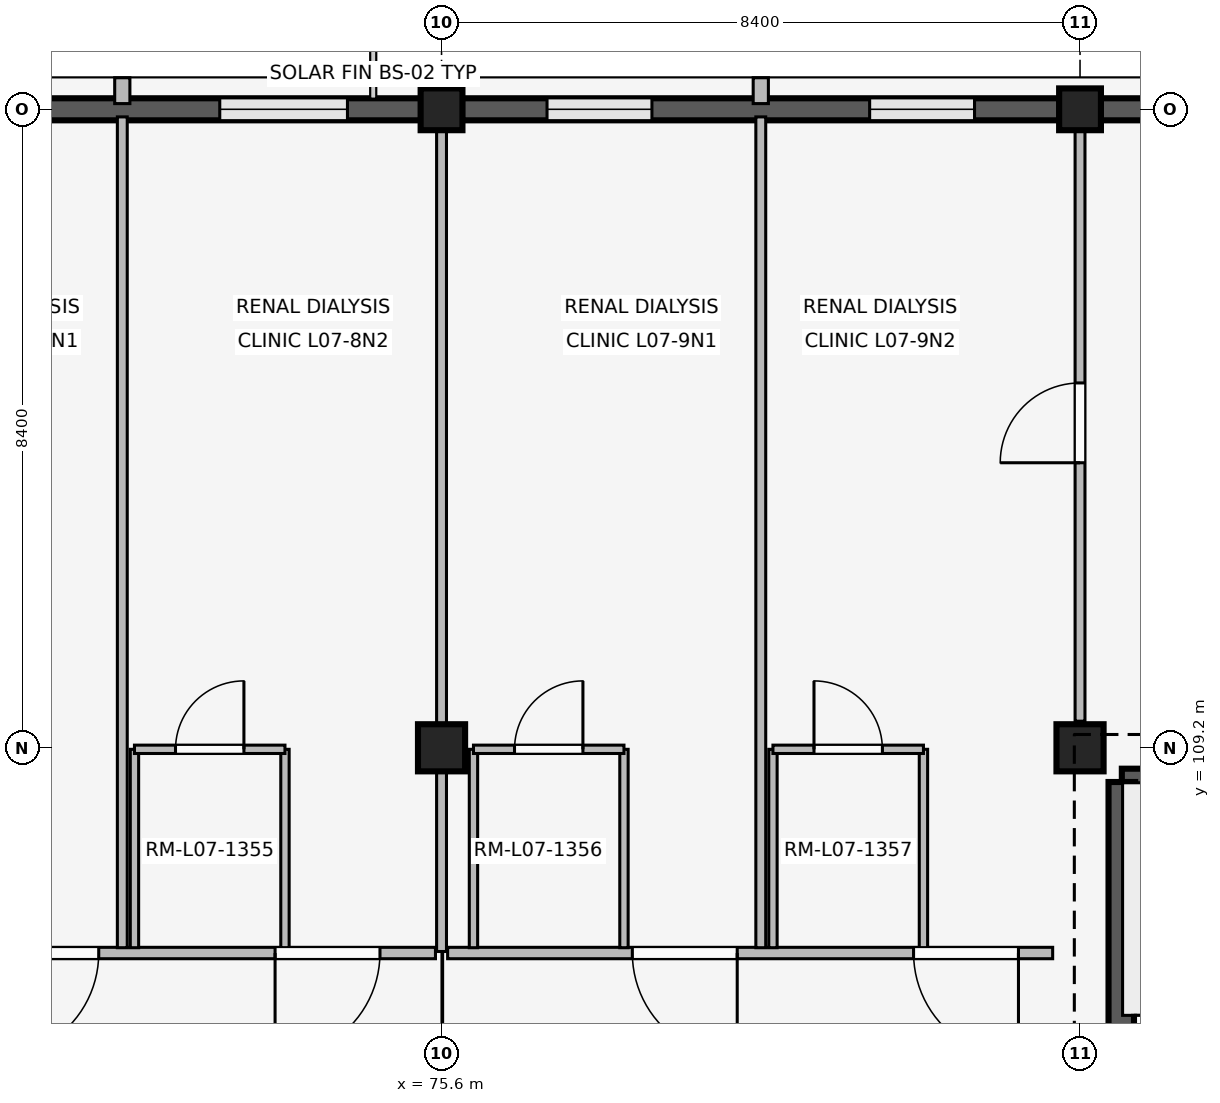
"""IFC4 building model, lengths in metres.
Left out: names, types, materials, properties, quantities, classifications, styles, units other than length and angle.
Written with IfcOpenShell. Run it as: python <this file> out.ifc"""

import sys

from ifc_helpers import new_model, si_unit, direction, frame, frame_2d, origin, origin_2d, place, context, subcontext, project, spatial, rectangle, extrude, element, fill, save


model = new_model("IFC4")
c1 = context("Model", 3, precision=1e-05, world=origin(), true_north=direction((0.0, 1.0)))
c2 = subcontext(c1, "Body", "Model", "MODEL_VIEW")
j1 = project(units=[si_unit("LENGTHUNIT", "METRE"), si_unit("PLANEANGLEUNIT", "RADIAN")], contexts=[c1])
p1 = place(None, origin())
s1 = spatial("IfcSite", under=j1, at=p1, CompositionType="ELEMENT")
p2 = place(p1, origin())
s2 = spatial("IfcBuilding", under=s1, at=p2, CompositionType="ELEMENT")
p3 = place(p2, frame((0.0, 0.0, 28.8)))
s3 = spatial("IfcBuildingStorey", under=s2, at=p3, CompositionType="ELEMENT", Elevation=28.8)
p4 = place(p3, frame((75.6, 109.2, 0.0), z_axis=(0.0, 0.0, 1.0), x_axis=(1.0, 0.0, 0.0)))
e1 = element("IfcColumn", 1, at=p4, inside=s3, PredefinedType="COLUMN", context=c2, shape_type="SweptSolid", body=[
    extrude(rectangle(XDim=0.62, YDim=0.62, at=origin_2d()), origin(), (0.0, 0.0, 1.0), 4.2),
])
p5 = place(p3, frame((75.6, 117.6, 0.0), z_axis=(0.0, 0.0, 1.0), x_axis=(1.0, 0.0, 0.0)))
e2 = element("IfcColumn", 2, at=p5, inside=s3, PredefinedType="COLUMN", context=c2, shape_type="SweptSolid", body=[
    extrude(rectangle(XDim=0.55, YDim=0.55, at=origin_2d()), origin(), (0.0, 0.0, 1.0), 4.2),
])
p6 = place(p3, frame((84.0, 109.2, 0.0), z_axis=(0.0, 0.0, 1.0), x_axis=(1.0, 0.0, 0.0)))
e3 = element("IfcColumn", 3, at=p6, inside=s3, PredefinedType="COLUMN", context=c2, shape_type="SweptSolid", body=[
    extrude(rectangle(XDim=0.62, YDim=0.62, at=origin_2d()), origin(), (0.0, 0.0, 1.0), 4.2),
])
p7 = place(p3, frame((84.0, 117.6, 0.0), z_axis=(0.0, 0.0, 1.0), x_axis=(1.0, 0.0, 0.0)))
e4 = element("IfcColumn", 4, at=p7, inside=s3, PredefinedType="COLUMN", context=c2, shape_type="SweptSolid", body=[
    extrude(rectangle(XDim=0.55, YDim=0.55, at=origin_2d()), origin(), (0.0, 0.0, 1.0), 4.2),
])
p8 = place(p3, frame((67.47, 117.6, 0.0), z_axis=(0.0, 0.0, 1.0), x_axis=(1.0, 0.0, 0.0)))
e5 = element("IfcWall", 5, at=p8, inside=s3, PredefinedType="SOLIDWALL", context=c2, shape_type="SweptSolid", body=[
    extrude(rectangle(XDim=7.86, YDim=0.29, at=frame_2d((3.93, 0.0))), origin(), (0.0, 0.0, 1.0), 3.34),
])
p9 = place(p8, frame((0.968, 0.0, 0.85)))
e6 = element("IfcOpeningElement", 6, at=p9, cuts=e5, PredefinedType="OPENING", context=c2, shape_type="SweptSolid", body=[
    extrude(rectangle(XDim=1.68, YDim=2.05, at=frame_2d((0.84, 1.025))), frame((0.0, 0.155, 0.0), z_axis=(0.0, -1.0, 0.0), x_axis=(1.0, 0.0, 0.0)), (0.0, 0.0, 1.0), 0.31),
])
p10 = place(p8, frame((5.212, 0.0, 0.85)))
e7 = element("IfcOpeningElement", 7, at=p10, cuts=e5, PredefinedType="OPENING", context=c2, shape_type="SweptSolid", body=[
    extrude(rectangle(XDim=1.68, YDim=2.05, at=frame_2d((0.84, 1.025))), frame((0.0, 0.155, 0.0), z_axis=(0.0, -1.0, 0.0), x_axis=(1.0, 0.0, 0.0)), (0.0, 0.0, 1.0), 0.31),
])
p11 = place(p3, frame((71.4, 117.675, 0.0), z_axis=(0.0, 0.0, 1.0), x_axis=(0.0, 1.0, 0.0)))
e8 = element("IfcWall", 8, at=p11, inside=s3, PredefinedType="ELEMENTEDWALL", context=c2, shape_type="SweptSolid", body=[
    extrude(rectangle(XDim=0.34, YDim=0.2, at=frame_2d((0.17, 0.0))), origin(), (0.0, 0.0, 1.0), 3.32),
])
p12 = place(p3, frame((75.87, 117.6, 0.0), z_axis=(0.0, 0.0, 1.0), x_axis=(1.0, 0.0, 0.0)))
e9 = element("IfcWall", 9, at=p12, inside=s3, PredefinedType="SOLIDWALL", context=c2, shape_type="SweptSolid", body=[
    extrude(rectangle(XDim=7.86, YDim=0.29, at=frame_2d((3.93, 0.0))), origin(), (0.0, 0.0, 1.0), 3.34),
])
p13 = place(p12, frame((1.118, 0.0, 0.85)))
e10 = element("IfcOpeningElement", 10, at=p13, cuts=e9, PredefinedType="OPENING", context=c2, shape_type="SweptSolid", body=[
    extrude(rectangle(XDim=1.38, YDim=1.5, at=frame_2d((0.69, 0.75))), frame((0.0, 0.155, 0.0), z_axis=(0.0, -1.0, 0.0), x_axis=(1.0, 0.0, 0.0)), (0.0, 0.0, 1.0), 0.31),
])
p14 = place(p12, frame((5.362, 0.0, 0.85)))
e11 = element("IfcOpeningElement", 11, at=p14, cuts=e9, PredefinedType="OPENING", context=c2, shape_type="SweptSolid", body=[
    extrude(rectangle(XDim=1.38, YDim=1.5, at=frame_2d((0.69, 0.75))), frame((0.0, 0.155, 0.0), z_axis=(0.0, -1.0, 0.0), x_axis=(1.0, 0.0, 0.0)), (0.0, 0.0, 1.0), 0.31),
])
p15 = place(p3, frame((79.8, 117.675, 0.0), z_axis=(0.0, 0.0, 1.0), x_axis=(0.0, 1.0, 0.0)))
e12 = element("IfcWall", 12, at=p15, inside=s3, PredefinedType="ELEMENTEDWALL", context=c2, shape_type="SweptSolid", body=[
    extrude(rectangle(XDim=0.34, YDim=0.2, at=frame_2d((0.17, 0.0))), origin(), (0.0, 0.0, 1.0), 3.32),
])
p16 = place(p3, frame((84.27, 117.6, 0.0), z_axis=(0.0, 0.0, 1.0), x_axis=(1.0, 0.0, 0.0)))
e13 = element("IfcWall", 13, at=p16, inside=s3, PredefinedType="SOLIDWALL", context=c2, shape_type="SweptSolid", body=[
    extrude(rectangle(XDim=7.86, YDim=0.29, at=frame_2d((3.93, 0.0))), origin(), (0.0, 0.0, 1.0), 3.34),
])
p17 = place(p16, frame((1.028, 0.0, 0.85)))
e14 = element("IfcOpeningElement", 14, at=p17, cuts=e13, PredefinedType="OPENING", context=c2, shape_type="SweptSolid", body=[
    extrude(rectangle(XDim=1.56, YDim=1.7, at=frame_2d((0.78, 0.85))), frame((0.0, 0.155, 0.0), z_axis=(0.0, -1.0, 0.0), x_axis=(1.0, 0.0, 0.0)), (0.0, 0.0, 1.0), 0.31),
])
p18 = place(p16, frame((5.272, 0.0, 0.85)))
e15 = element("IfcOpeningElement", 15, at=p18, cuts=e13, PredefinedType="OPENING", context=c2, shape_type="SweptSolid", body=[
    extrude(rectangle(XDim=1.56, YDim=1.7, at=frame_2d((0.78, 0.85))), frame((0.0, 0.155, 0.0), z_axis=(0.0, -1.0, 0.0), x_axis=(1.0, 0.0, 0.0)), (0.0, 0.0, 1.0), 0.31),
])
p19 = place(p3, frame((84.55, 108.75, 0.0), z_axis=(0.0, 0.0, 1.0), x_axis=(1.0, 0.0, 0.0)))
e16 = element("IfcWall", 16, at=p19, inside=s3, PredefinedType="SHEAR", context=c2, shape_type="SweptSolid", body=[
    extrude(rectangle(XDim=7.5, YDim=0.35, at=frame_2d((3.75, 0.0))), origin(), (0.0, 0.0, 1.0), 3.94),
])
p20 = place(p3, frame((84.55, 101.2, 0.0), z_axis=(0.0, 0.0, 1.0), x_axis=(0.0, 1.0, 0.0)))
e17 = element("IfcWall", 17, at=p20, inside=s3, PredefinedType="SHEAR", context=c2, shape_type="SweptSolid", body=[
    extrude(rectangle(XDim=7.55, YDim=0.35, at=frame_2d((3.775, 0.0))), origin(), (0.0, 0.0, 1.0), 3.94),
])
p21 = place(p20, frame((0.28, 0.0, 0.0)))
e18 = element("IfcOpeningElement", 18, at=p21, cuts=e17, PredefinedType="OPENING", context=c2, shape_type="SweptSolid", body=[
    extrude(rectangle(XDim=1.0, YDim=2.15, at=frame_2d((0.5, 1.075))), frame((0.0, 0.185, 0.0), z_axis=(0.0, -1.0, 0.0), x_axis=(1.0, 0.0, 0.0)), (0.0, 0.0, 1.0), 0.37),
])
p22 = place(p3, frame((75.52, 106.5, 0.0), z_axis=(0.0, 0.0, 1.0), x_axis=(-1.0, 0.0, 0.0)))
e19 = element("IfcWall", 19, at=p22, inside=s3, PredefinedType="PARTITIONING", context=c2, shape_type="SweptSolid", body=[
    extrude(rectangle(XDim=8.24, YDim=0.15, at=frame_2d((4.12, 0.0))), origin(), (0.0, 0.0, 1.0), 3.32),
])
p23 = place(p22, frame((0.73, 0.0, 0.0)))
e20 = element("IfcOpeningElement", 20, at=p23, cuts=e19, PredefinedType="OPENING", context=c2, shape_type="SweptSolid", body=[
    extrude(rectangle(XDim=1.38, YDim=2.25, at=frame_2d((0.69, 1.125))), frame((0.0, 0.085, 0.0), z_axis=(0.0, -1.0, 0.0), x_axis=(1.0, 0.0, 0.0)), (0.0, 0.0, 1.0), 0.17),
])
p24 = place(p22, frame((4.43, 0.0, 0.0)))
e21 = element("IfcOpeningElement", 21, at=p24, cuts=e19, PredefinedType="OPENING", context=c2, shape_type="SweptSolid", body=[
    extrude(rectangle(XDim=1.38, YDim=2.25, at=frame_2d((0.69, 1.125))), frame((0.0, 0.085, 0.0), z_axis=(0.0, -1.0, 0.0), x_axis=(1.0, 0.0, 0.0)), (0.0, 0.0, 1.0), 0.17),
])
p25 = place(p3, frame((71.4, 106.57, 0.0), z_axis=(0.0, 0.0, 1.0), x_axis=(0.0, 1.0, 0.0)))
e22 = element("IfcWall", 22, at=p25, inside=s3, PredefinedType="PARTITIONING", context=c2, shape_type="SweptSolid", body=[
    extrude(rectangle(XDim=10.93, YDim=0.13, at=frame_2d((5.465, 0.0))), origin(), (0.0, 0.0, 1.0), 3.32),
])
for number, where, z_axis, x_axis in (
    (23, (71.56, 106.57, 0.0), (0.0, 0.0, 1.0), (0.0, 1.0, 0.0)),
    (24, (73.54, 106.57, 0.0), (0.0, 0.0, 1.0), (0.0, 1.0, 0.0)),
):
    element("IfcWall", number, at=place(p3, frame(where, z_axis=z_axis, x_axis=x_axis)), inside=s3, PredefinedType="PARTITIONING", context=c2, shape_type="SweptSolid", body=[
        extrude(rectangle(XDim=2.61, YDim=0.11, at=frame_2d((1.305, 0.0))), origin(), (0.0, 0.0, 1.0), 3.32),
    ])
p26 = place(p3, frame((71.56, 109.18, 0.0), z_axis=(0.0, 0.0, 1.0), x_axis=(1.0, 0.0, 0.0)))
e25 = element("IfcWall", 25, at=p26, inside=s3, PredefinedType="PARTITIONING", context=c2, shape_type="SweptSolid", body=[
    extrude(rectangle(XDim=1.98, YDim=0.11, at=frame_2d((0.99, 0.0))), origin(), (0.0, 0.0, 1.0), 3.32),
])
p27 = place(p26, frame((0.54, 0.0, 0.0)))
e26 = element("IfcOpeningElement", 26, at=p27, cuts=e25, PredefinedType="OPENING", context=c2, shape_type="SweptSolid", body=[
    extrude(rectangle(XDim=0.9, YDim=2.1, at=frame_2d((0.45, 1.05))), frame((0.0, 0.065, 0.0), z_axis=(0.0, -1.0, 0.0), x_axis=(1.0, 0.0, 0.0)), (0.0, 0.0, 1.0), 0.13),
])
p28 = place(p3, frame((75.6, 106.52, 0.0), z_axis=(0.0, 0.0, 1.0), x_axis=(0.0, 1.0, 0.0)))
e27 = element("IfcWall", 27, at=p28, inside=s3, PredefinedType="PARTITIONING", context=c2, shape_type="SweptSolid", body=[
    extrude(rectangle(XDim=10.94, YDim=0.13, at=frame_2d((5.47, 0.0))), origin(), (0.0, 0.0, 1.0), 3.32),
])
p29 = place(p3, frame((83.64, 106.5, 0.0), z_axis=(0.0, 0.0, 1.0), x_axis=(-1.0, 0.0, 0.0)))
e28 = element("IfcWall", 28, at=p29, inside=s3, PredefinedType="PARTITIONING", context=c2, shape_type="SweptSolid", body=[
    extrude(rectangle(XDim=7.96, YDim=0.15, at=frame_2d((3.98, 0.0))), origin(), (0.0, 0.0, 1.0), 3.32),
])
p30 = place(p29, frame((0.45, 0.0, 0.0)))
e29 = element("IfcOpeningElement", 29, at=p30, cuts=e28, PredefinedType="OPENING", context=c2, shape_type="SweptSolid", body=[
    extrude(rectangle(XDim=1.38, YDim=2.25, at=frame_2d((0.69, 1.125))), frame((0.0, 0.085, 0.0), z_axis=(0.0, -1.0, 0.0), x_axis=(1.0, 0.0, 0.0)), (0.0, 0.0, 1.0), 0.17),
])
p31 = place(p29, frame((4.15, 0.0, 0.0)))
e30 = element("IfcOpeningElement", 30, at=p31, cuts=e28, PredefinedType="OPENING", context=c2, shape_type="SweptSolid", body=[
    extrude(rectangle(XDim=1.38, YDim=2.25, at=frame_2d((0.69, 1.125))), frame((0.0, 0.085, 0.0), z_axis=(0.0, -1.0, 0.0), x_axis=(1.0, 0.0, 0.0)), (0.0, 0.0, 1.0), 0.17),
])
p32 = place(p3, frame((79.8, 106.57, 0.0), z_axis=(0.0, 0.0, 1.0), x_axis=(0.0, 1.0, 0.0)))
e31 = element("IfcWall", 31, at=p32, inside=s3, PredefinedType="PARTITIONING", context=c2, shape_type="SweptSolid", body=[
    extrude(rectangle(XDim=10.93, YDim=0.13, at=frame_2d((5.465, 0.0))), origin(), (0.0, 0.0, 1.0), 3.32),
])
for number, where, z_axis, x_axis in (
    (32, (76.02, 106.57, 0.0), (0.0, 0.0, 1.0), (0.0, 1.0, 0.0)),
    (33, (78.0, 106.57, 0.0), (0.0, 0.0, 1.0), (0.0, 1.0, 0.0)),
):
    element("IfcWall", number, at=place(p3, frame(where, z_axis=z_axis, x_axis=x_axis)), inside=s3, PredefinedType="PARTITIONING", context=c2, shape_type="SweptSolid", body=[
        extrude(rectangle(XDim=2.61, YDim=0.11, at=frame_2d((1.305, 0.0))), origin(), (0.0, 0.0, 1.0), 3.32),
    ])
p33 = place(p3, frame((76.02, 109.18, 0.0), z_axis=(0.0, 0.0, 1.0), x_axis=(1.0, 0.0, 0.0)))
e34 = element("IfcWall", 34, at=p33, inside=s3, PredefinedType="PARTITIONING", context=c2, shape_type="SweptSolid", body=[
    extrude(rectangle(XDim=1.98, YDim=0.11, at=frame_2d((0.99, 0.0))), origin(), (0.0, 0.0, 1.0), 3.32),
])
p34 = place(p33, frame((0.54, 0.0, 0.0)))
e35 = element("IfcOpeningElement", 35, at=p34, cuts=e34, PredefinedType="OPENING", context=c2, shape_type="SweptSolid", body=[
    extrude(rectangle(XDim=0.9, YDim=2.1, at=frame_2d((0.45, 1.05))), frame((0.0, 0.065, 0.0), z_axis=(0.0, -1.0, 0.0), x_axis=(1.0, 0.0, 0.0)), (0.0, 0.0, 1.0), 0.13),
])
for number, where, z_axis, x_axis in (
    (36, (79.96, 106.57, 0.0), (0.0, 0.0, 1.0), (0.0, 1.0, 0.0)),
    (37, (81.94, 106.57, 0.0), (0.0, 0.0, 1.0), (0.0, 1.0, 0.0)),
):
    element("IfcWall", number, at=place(p3, frame(where, z_axis=z_axis, x_axis=x_axis)), inside=s3, PredefinedType="PARTITIONING", context=c2, shape_type="SweptSolid", body=[
        extrude(rectangle(XDim=2.61, YDim=0.11, at=frame_2d((1.305, 0.0))), origin(), (0.0, 0.0, 1.0), 3.32),
    ])
p35 = place(p3, frame((79.96, 109.18, 0.0), z_axis=(0.0, 0.0, 1.0), x_axis=(1.0, 0.0, 0.0)))
e38 = element("IfcWall", 38, at=p35, inside=s3, PredefinedType="PARTITIONING", context=c2, shape_type="SweptSolid", body=[
    extrude(rectangle(XDim=1.98, YDim=0.11, at=frame_2d((0.99, 0.0))), origin(), (0.0, 0.0, 1.0), 3.32),
])
p36 = place(p35, frame((0.54, 0.0, 0.0)))
e39 = element("IfcOpeningElement", 39, at=p36, cuts=e38, PredefinedType="OPENING", context=c2, shape_type="SweptSolid", body=[
    extrude(rectangle(XDim=0.9, YDim=2.1, at=frame_2d((0.45, 1.05))), frame((0.0, 0.065, 0.0), z_axis=(0.0, -1.0, 0.0), x_axis=(1.0, 0.0, 0.0)), (0.0, 0.0, 1.0), 0.13),
])
p37 = place(p3, frame((84.0, 109.55, 0.0), z_axis=(0.0, 0.0, 1.0), x_axis=(0.0, 1.0, 0.0)))
e40 = element("IfcWall", 40, at=p37, inside=s3, PredefinedType="PARTITIONING", context=c2, shape_type="SweptSolid", body=[
    extrude(rectangle(XDim=7.91, YDim=0.13, at=frame_2d((3.955, 0.0))), origin(), (0.0, 0.0, 1.0), 3.32),
])
p38 = place(p37, frame((3.4, 0.0, 0.0)))
e41 = element("IfcOpeningElement", 41, at=p38, cuts=e40, PredefinedType="OPENING", context=c2, shape_type="SweptSolid", body=[
    extrude(rectangle(XDim=1.05, YDim=2.2, at=frame_2d((0.525, 1.1))), frame((0.0, 0.075, 0.0), z_axis=(0.0, -1.0, 0.0), x_axis=(1.0, 0.0, 0.0)), (0.0, 0.0, 1.0), 0.15),
])
p39 = place(p10, origin())
e42 = element("IfcWindow", 42, at=p39, inside=s3, PartitioningType="SINGLE_PANEL", PredefinedType="WINDOW", context=c2, shape_type="SweptSolid", body=[
    extrude(rectangle(XDim=1.68, YDim=2.05, at=frame_2d((0.84, 1.025))), frame((0.0, 0.03, 0.0), z_axis=(0.0, -1.0, 0.0), x_axis=(1.0, 0.0, 0.0)), (0.0, 0.0, 1.0), 0.06),
])
fill(e7, e42)
p40 = place(p13, origin())
e43 = element("IfcWindow", 43, at=p40, inside=s3, PartitioningType="SINGLE_PANEL", PredefinedType="WINDOW", context=c2, shape_type="SweptSolid", body=[
    extrude(rectangle(XDim=1.38, YDim=1.5, at=frame_2d((0.69, 0.75))), frame((0.0, 0.03, 0.0), z_axis=(0.0, -1.0, 0.0), x_axis=(1.0, 0.0, 0.0)), (0.0, 0.0, 1.0), 0.06),
])
fill(e10, e43)
p41 = place(p14, origin())
e44 = element("IfcWindow", 44, at=p41, inside=s3, PartitioningType="SINGLE_PANEL", PredefinedType="WINDOW", context=c2, shape_type="SweptSolid", body=[
    extrude(rectangle(XDim=1.38, YDim=1.5, at=frame_2d((0.69, 0.75))), frame((0.0, 0.03, 0.0), z_axis=(0.0, -1.0, 0.0), x_axis=(1.0, 0.0, 0.0)), (0.0, 0.0, 1.0), 0.06),
])
fill(e11, e44)
p42 = place(p23, origin())
e45 = element("IfcDoor", 45, at=p42, inside=s3, OperationType="SINGLE_SWING_RIGHT", PredefinedType="DOOR", context=c2, shape_type="SweptSolid", body=[
    extrude(rectangle(XDim=1.38, YDim=2.25, at=frame_2d((0.69, 1.125))), frame((0.0, 0.025, 0.0), z_axis=(0.0, -1.0, 0.0), x_axis=(1.0, 0.0, 0.0)), (0.0, 0.0, 1.0), 0.05),
])
fill(e20, e45)
p43 = place(p24, origin())
e46 = element("IfcDoor", 46, at=p43, inside=s3, OperationType="SINGLE_SWING_RIGHT", PredefinedType="DOOR", context=c2, shape_type="SweptSolid", body=[
    extrude(rectangle(XDim=1.38, YDim=2.25, at=frame_2d((0.69, 1.125))), frame((0.0, 0.025, 0.0), z_axis=(0.0, -1.0, 0.0), x_axis=(1.0, 0.0, 0.0)), (0.0, 0.0, 1.0), 0.05),
])
fill(e21, e46)
p44 = place(p27, origin())
e47 = element("IfcDoor", 47, at=p44, inside=s3, OperationType="SINGLE_SWING_RIGHT", PredefinedType="DOOR", context=c2, shape_type="SweptSolid", body=[
    extrude(rectangle(XDim=0.9, YDim=2.1, at=frame_2d((0.45, 1.05))), frame((0.0, 0.025, 0.0), z_axis=(0.0, -1.0, 0.0), x_axis=(1.0, 0.0, 0.0)), (0.0, 0.0, 1.0), 0.05),
])
fill(e26, e47)
p45 = place(p30, origin())
e48 = element("IfcDoor", 48, at=p45, inside=s3, OperationType="SINGLE_SWING_LEFT", PredefinedType="DOOR", context=c2, shape_type="SweptSolid", body=[
    extrude(rectangle(XDim=1.38, YDim=2.25, at=frame_2d((0.69, 1.125))), frame((0.0, 0.025, 0.0), z_axis=(0.0, -1.0, 0.0), x_axis=(1.0, 0.0, 0.0)), (0.0, 0.0, 1.0), 0.05),
])
fill(e29, e48)
p46 = place(p31, origin())
e49 = element("IfcDoor", 49, at=p46, inside=s3, OperationType="SINGLE_SWING_LEFT", PredefinedType="DOOR", context=c2, shape_type="SweptSolid", body=[
    extrude(rectangle(XDim=1.38, YDim=2.25, at=frame_2d((0.69, 1.125))), frame((0.0, 0.025, 0.0), z_axis=(0.0, -1.0, 0.0), x_axis=(1.0, 0.0, 0.0)), (0.0, 0.0, 1.0), 0.05),
])
fill(e30, e49)
p47 = place(p34, origin())
e50 = element("IfcDoor", 50, at=p47, inside=s3, OperationType="SINGLE_SWING_RIGHT", PredefinedType="DOOR", context=c2, shape_type="SweptSolid", body=[
    extrude(rectangle(XDim=0.9, YDim=2.1, at=frame_2d((0.45, 1.05))), frame((0.0, 0.025, 0.0), z_axis=(0.0, -1.0, 0.0), x_axis=(1.0, 0.0, 0.0)), (0.0, 0.0, 1.0), 0.05),
])
fill(e35, e50)
p48 = place(p36, origin())
e51 = element("IfcDoor", 51, at=p48, inside=s3, OperationType="SINGLE_SWING_LEFT", PredefinedType="DOOR", context=c2, shape_type="SweptSolid", body=[
    extrude(rectangle(XDim=0.9, YDim=2.1, at=frame_2d((0.45, 1.05))), frame((0.0, 0.025, 0.0), z_axis=(0.0, -1.0, 0.0), x_axis=(1.0, 0.0, 0.0)), (0.0, 0.0, 1.0), 0.05),
])
fill(e39, e51)
p49 = place(p38, origin())
e52 = element("IfcDoor", 52, at=p49, inside=s3, OperationType="SINGLE_SWING_LEFT", PredefinedType="DOOR", context=c2, shape_type="SweptSolid", body=[
    extrude(rectangle(XDim=1.05, YDim=2.2, at=frame_2d((0.525, 1.1))), frame((0.0, 0.025, 0.0), z_axis=(0.0, -1.0, 0.0), x_axis=(1.0, 0.0, 0.0)), (0.0, 0.0, 1.0), 0.05),
])
fill(e41, e52)
save(model, sys.argv[1])
